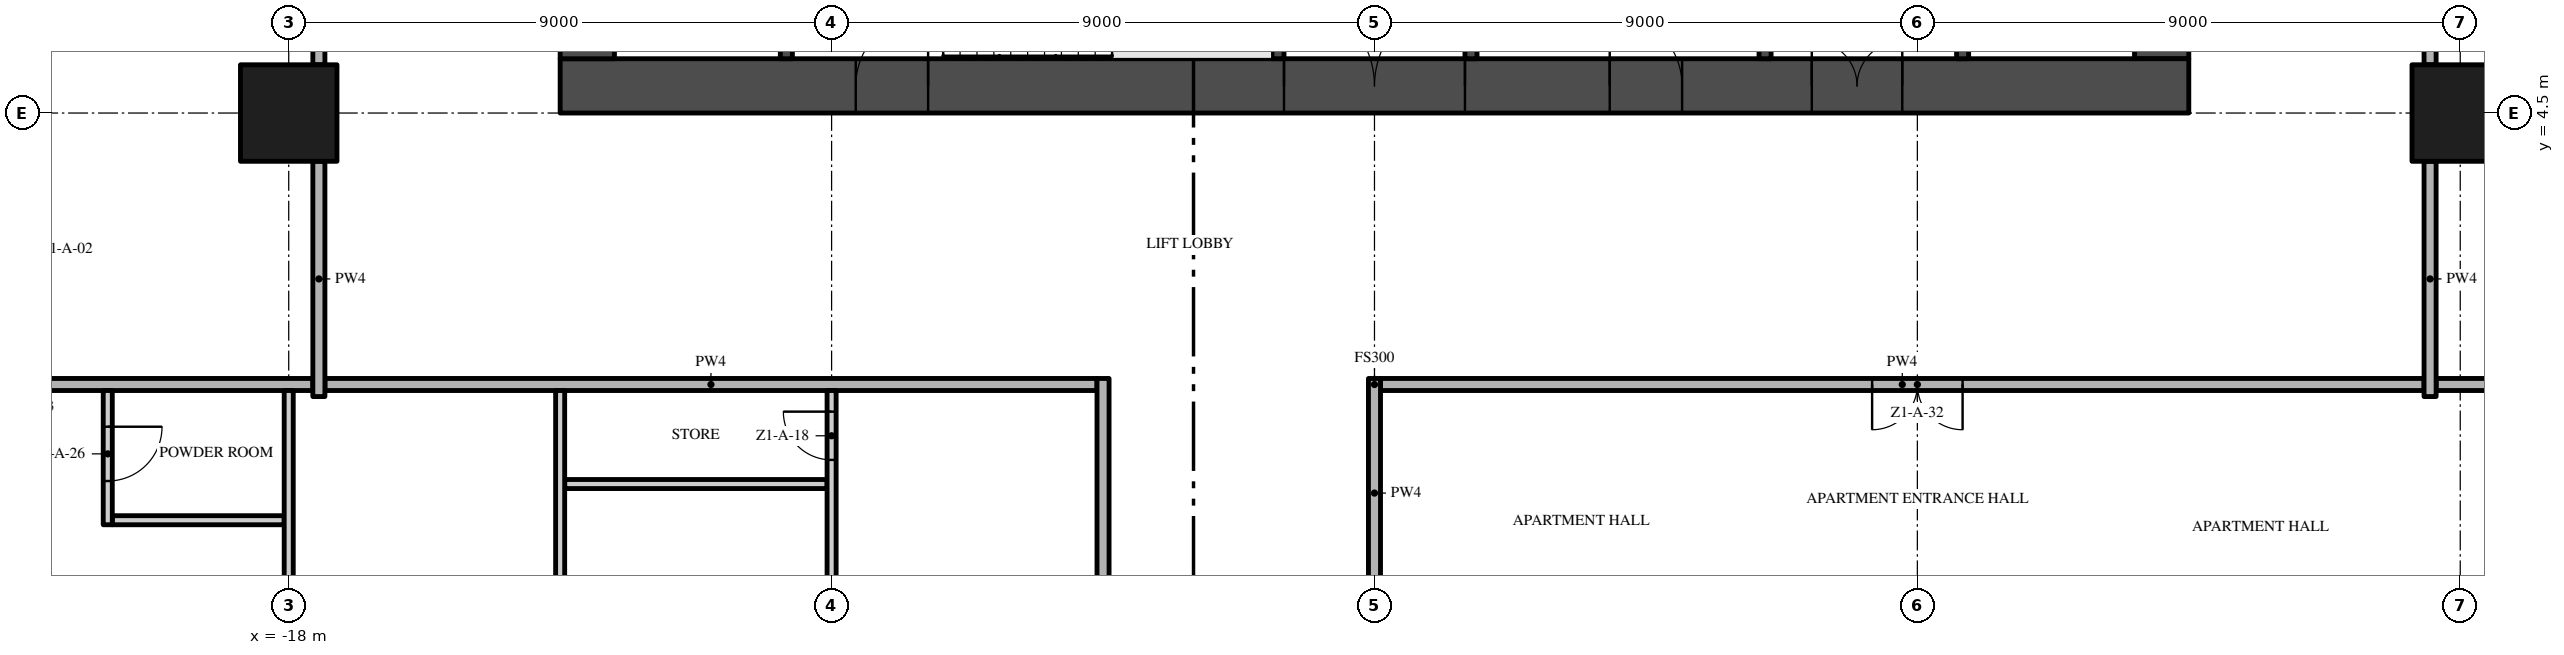
"""IFC4 building model, lengths in metres.
Left out: names, types, materials, properties, quantities, classifications, styles, units other than length and angle.
Written with IfcOpenShell. Run it as: python <this file> out.ifc"""

import sys

from ifc_helpers import new_model, si_unit, direction, frame, frame_2d, origin, origin_2d, place, context, subcontext, project, spatial, rectangle, extrude, element, fill, save


model = new_model("IFC4")
c1 = context("Model", 3, precision=1e-05, world=origin(), true_north=direction((0.0, 1.0)))
c2 = subcontext(c1, "Body", "Model", "MODEL_VIEW")
j1 = project(units=[si_unit("LENGTHUNIT", "METRE"), si_unit("PLANEANGLEUNIT", "RADIAN")], contexts=[c1])
p1 = place(None, origin())
s1 = spatial("IfcSite", under=j1, at=p1, CompositionType="ELEMENT")
p2 = place(p1, origin())
s2 = spatial("IfcBuilding", under=s1, at=p2, CompositionType="ELEMENT")
p3 = place(p2, frame((0.0, 0.0, 18.8)))
s3 = spatial("IfcBuildingStorey", under=s2, at=p3, CompositionType="ELEMENT", Elevation=18.8)
p4 = place(p3, frame((-13.5, 4.95, -0.3), z_axis=(0.0, 0.0, 1.0), x_axis=(1.0, 0.0, 0.0)))
e1 = element("IfcWall", 1, at=p4, inside=s3, PredefinedType="SHEAR", context=c2, shape_type="SweptSolid", body=[
    extrude(rectangle(XDim=27.0, YDim=0.9, at=frame_2d((13.5, 0.0))), origin(), (0.0, 0.0, 1.0), 3.8),
])
p5 = place(p4, frame((12.0, 0.0, 0.3)))
e2 = element("IfcOpeningElement", 2, at=p5, cuts=e1, PredefinedType="OPENING", context=c2, shape_type="SweptSolid", body=[
    extrude(rectangle(XDim=3.0, YDim=2.4, at=frame_2d((1.5, 1.2))), frame((0.0, 0.46, 0.0), z_axis=(0.0, -1.0, 0.0), x_axis=(1.0, 0.0, 0.0)), (0.0, 0.0, 1.0), 0.92),
])
p6 = place(p4, frame((4.9, 0.0, 0.3)))
e3 = element("IfcOpeningElement", 3, at=p6, cuts=e1, PredefinedType="OPENING", context=c2, shape_type="SweptSolid", body=[
    extrude(rectangle(XDim=1.2, YDim=2.2, at=frame_2d((0.6, 1.1))), frame((0.0, 0.46, 0.0), z_axis=(0.0, -1.0, 0.0), x_axis=(1.0, 0.0, 0.0)), (0.0, 0.0, 1.0), 0.92),
])
p7 = place(p4, frame((20.75, 0.0, 0.3)))
e4 = element("IfcOpeningElement", 4, at=p7, cuts=e1, PredefinedType="OPENING", context=c2, shape_type="SweptSolid", body=[
    extrude(rectangle(XDim=1.5, YDim=2.2, at=frame_2d((0.75, 1.1))), frame((0.0, 0.46, 0.0), z_axis=(0.0, -1.0, 0.0), x_axis=(1.0, 0.0, 0.0)), (0.0, 0.0, 1.0), 0.92),
])
p8 = place(p4, frame((17.4, 0.0, 0.3)))
e5 = element("IfcOpeningElement", 5, at=p8, cuts=e1, PredefinedType="OPENING", context=c2, shape_type="SweptSolid", body=[
    extrude(rectangle(XDim=1.2, YDim=2.2, at=frame_2d((0.6, 1.1))), frame((0.0, 0.46, 0.0), z_axis=(0.0, -1.0, 0.0), x_axis=(1.0, 0.0, 0.0)), (0.0, 0.0, 1.0), 0.92),
])
p9 = place(p3, frame((13.05, 5.4, -0.3), z_axis=(0.0, 0.0, 1.0), x_axis=(0.0, 1.0, 0.0)))
e6 = element("IfcWall", 6, at=p9, inside=s3, PredefinedType="SHEAR", context=c2, shape_type="SweptSolid", body=[
    extrude(rectangle(XDim=16.2, YDim=0.9, at=frame_2d((8.1, 0.0))), origin(), (0.0, 0.0, 1.0), 3.8),
])
p10 = place(p9, frame((6.0, 0.0, 0.3)))
e7 = element("IfcOpeningElement", 7, at=p10, cuts=e6, PredefinedType="OPENING", context=c2, shape_type="SweptSolid", body=[
    extrude(rectangle(XDim=1.2, YDim=2.2, at=frame_2d((0.6, 1.1))), frame((0.0, 0.46, 0.0), z_axis=(0.0, -1.0, 0.0), x_axis=(1.0, 0.0, 0.0)), (0.0, 0.0, 1.0), 0.92),
])
p11 = place(p3, frame((-13.05, 21.6, -0.3), z_axis=(0.0, 0.0, 1.0), x_axis=(0.0, -1.0, 0.0)))
e8 = element("IfcWall", 8, at=p11, inside=s3, PredefinedType="SHEAR", context=c2, shape_type="SweptSolid", body=[
    extrude(rectangle(XDim=16.2, YDim=0.9, at=frame_2d((8.1, 0.0))), origin(), (0.0, 0.0, 1.0), 3.8),
])
p12 = place(p11, frame((9.0, 0.0, 0.3)))
e9 = element("IfcOpeningElement", 9, at=p12, cuts=e8, PredefinedType="OPENING", context=c2, shape_type="SweptSolid", body=[
    extrude(rectangle(XDim=1.2, YDim=2.2, at=frame_2d((0.6, 1.1))), frame((0.0, 0.46, 0.0), z_axis=(0.0, -1.0, 0.0), x_axis=(1.0, 0.0, 0.0)), (0.0, 0.0, 1.0), 0.92),
])
for number, where, z_axis, x_axis in (
    (10, (-18.0, 4.5, 0.0), (0.0, 0.0, 1.0), (1.0, 0.0, 0.0)),
    (11, (18.0, 4.5, 0.0), (0.0, 0.0, 1.0), (1.0, 0.0, 0.0)),
):
    element("IfcColumn", number, at=place(p3, frame(where, z_axis=z_axis, x_axis=x_axis)), inside=s3, PredefinedType="COLUMN", context=c2, shape_type="SweptSolid", body=[
        extrude(rectangle(XDim=1.6, YDim=1.6, at=origin_2d()), origin(), (0.0, 0.0, 1.0), 3.5),
    ])
for number, where, z_axis, x_axis in (
    (12, (-9.75, 5.4, 0.0), (0.0, 0.0, 1.0), (0.0, 1.0, 0.0)),
    (13, (-1.6, 5.4, 0.0), (0.0, 0.0, 1.0), (0.0, 1.0, 0.0)),
):
    element("IfcWall", number, at=place(p3, frame(where, z_axis=z_axis, x_axis=x_axis)), inside=s3, PredefinedType="SHEAR", context=c2, shape_type="SweptSolid", body=[
        extrude(rectangle(XDim=2.55, YDim=0.2, at=frame_2d((1.275, 0.0))), origin(), (0.0, 0.0, 1.0), 3.5),
    ])
p13 = place(p3, frame((1.6, 11.5, 0.0), z_axis=(0.0, 0.0, 1.0), x_axis=(0.0, -1.0, 0.0)))
e14 = element("IfcWall", 14, at=p13, inside=s3, PredefinedType="SHEAR", context=c2, shape_type="SweptSolid", body=[
    extrude(rectangle(XDim=6.1, YDim=0.2, at=frame_2d((3.05, 0.0))), origin(), (0.0, 0.0, 1.0), 3.5),
])
p14 = place(p13, frame((2.2, 0.0, 0.0)))
e15 = element("IfcOpeningElement", 15, at=p14, cuts=e14, PredefinedType="OPENING", context=c2, shape_type="SweptSolid", body=[
    extrude(rectangle(XDim=0.9, YDim=2.1, at=frame_2d((0.45, 1.05))), frame((0.0, 0.11, 0.0), z_axis=(0.0, -1.0, 0.0), x_axis=(1.0, 0.0, 0.0)), (0.0, 0.0, 1.0), 0.22),
])
p15 = place(p3, frame((6.475, 5.4, 0.0), z_axis=(0.0, 0.0, 1.0), x_axis=(0.0, 1.0, 0.0)))
e16 = element("IfcWall", 16, at=p15, inside=s3, PredefinedType="SHEAR", context=c2, shape_type="SweptSolid", body=[
    extrude(rectangle(XDim=6.1, YDim=0.2, at=frame_2d((3.05, 0.0))), origin(), (0.0, 0.0, 1.0), 3.5),
])
p16 = place(p3, frame((9.75, 5.4, 0.0), z_axis=(0.0, 0.0, 1.0), x_axis=(0.0, 1.0, 0.0)))
e17 = element("IfcWall", 17, at=p16, inside=s3, PredefinedType="SHEAR", context=c2, shape_type="SweptSolid", body=[
    extrude(rectangle(XDim=2.2, YDim=0.2, at=frame_2d((1.1, 0.0))), origin(), (0.0, 0.0, 1.0), 3.5),
])
p17 = place(p16, frame((0.55, 0.0, 0.0)))
e18 = element("IfcOpeningElement", 18, at=p17, cuts=e17, PredefinedType="OPENING", context=c2, shape_type="SweptSolid", body=[
    extrude(rectangle(XDim=1.1, YDim=2.1, at=frame_2d((0.55, 1.05))), frame((0.0, 0.11, 0.0), z_axis=(0.0, -1.0, 0.0), x_axis=(1.0, 0.0, 0.0)), (0.0, 0.0, 1.0), 0.22),
])
p18 = place(p3, frame((-20.925, -2.25, 0.0), z_axis=(0.0, 0.0, 1.0), x_axis=(1.0, 0.0, 0.0)))
e19 = element("IfcWall", 19, at=p18, inside=s3, PredefinedType="PARTITIONING", context=c2, shape_type="SweptSolid", body=[
    extrude(rectangle(XDim=2.85, YDim=0.15, at=frame_2d((1.425, 0.0))), origin(), (0.0, 0.0, 1.0), 3.5),
])
p19 = place(p3, frame((-13.425, -1.65, 0.0), z_axis=(0.0, 0.0, 1.0), x_axis=(1.0, 0.0, 0.0)))
e20 = element("IfcWall", 20, at=p19, inside=s3, PredefinedType="PARTITIONING", context=c2, shape_type="SweptSolid", body=[
    extrude(rectangle(XDim=4.35, YDim=0.15, at=frame_2d((2.175, 0.0))), origin(), (0.0, 0.0, 1.0), 3.5),
])
p20 = place(p3, frame((-17.4, 0.0, 0.0), z_axis=(0.0, 0.0, 1.0), x_axis=(1.0, 0.0, 0.0)))
e21 = element("IfcWall", 21, at=p20, inside=s3, PredefinedType="PARTITIONING", context=c2, shape_type="SweptSolid", body=[
    extrude(rectangle(XDim=12.8, YDim=0.2, at=frame_2d((6.4, 0.0))), origin(), (0.0, 0.0, 1.0), 3.5),
])
p21 = place(p3, frame((17.4, 0.0, 0.0), z_axis=(0.0, 0.0, 1.0), x_axis=(-1.0, 0.0, 0.0)))
e22 = element("IfcWall", 22, at=p21, inside=s3, PredefinedType="PARTITIONING", context=c2, shape_type="SweptSolid", body=[
    extrude(rectangle(XDim=17.3, YDim=0.2, at=frame_2d((8.65, 0.0))), origin(), (0.0, 0.0, 1.0), 3.5),
])
p22 = place(p21, frame((7.65, 0.0, 0.0)))
e23 = element("IfcOpeningElement", 23, at=p22, cuts=e22, PredefinedType="OPENING", context=c2, shape_type="SweptSolid", body=[
    extrude(rectangle(XDim=1.5, YDim=2.4, at=frame_2d((0.75, 1.2))), frame((0.0, 0.11, 0.0), z_axis=(0.0, -1.0, 0.0), x_axis=(1.0, 0.0, 0.0)), (0.0, 0.0, 1.0), 0.22),
])
for number, where, z_axis, x_axis in (
    (24, (-26.7, 0.0, 0.0), (0.0, 0.0, 1.0), (1.0, 0.0, 0.0)),
    (25, (17.6, 0.0, 0.0), (0.0, 0.0, 1.0), (1.0, 0.0, 0.0)),
):
    element("IfcWall", number, at=place(p3, frame(where, z_axis=z_axis, x_axis=x_axis)), inside=s3, PredefinedType="PARTITIONING", context=c2, shape_type="SweptSolid", body=[
        extrude(rectangle(XDim=9.1, YDim=0.2, at=frame_2d((4.55, 0.0))), origin(), (0.0, 0.0, 1.0), 3.5),
    ])
p23 = place(p3, frame((-21.0, -0.1, 0.0), z_axis=(0.0, 0.0, 1.0), x_axis=(0.0, -1.0, 0.0)))
e26 = element("IfcWall", 26, at=p23, inside=s3, PredefinedType="PARTITIONING", context=c2, shape_type="SweptSolid", body=[
    extrude(rectangle(XDim=2.225, YDim=0.15, at=frame_2d((1.113, 0.0))), origin(), (0.0, 0.0, 1.0), 3.5),
])
p24 = place(p23, frame((0.6, 0.0, 0.0)))
e27 = element("IfcOpeningElement", 27, at=p24, cuts=e26, PredefinedType="OPENING", context=c2, shape_type="SweptSolid", body=[
    extrude(rectangle(XDim=0.9, YDim=2.1, at=frame_2d((0.45, 1.05))), frame((0.0, 0.085, 0.0), z_axis=(0.0, -1.0, 0.0), x_axis=(1.0, 0.0, 0.0)), (0.0, 0.0, 1.0), 0.17),
])
p25 = place(p3, frame((-18.0, -3.7, 0.0), z_axis=(0.0, 0.0, 1.0), x_axis=(0.0, 1.0, 0.0)))
e28 = element("IfcWall", 28, at=p25, inside=s3, PredefinedType="PARTITIONING", context=c2, shape_type="SweptSolid", body=[
    extrude(rectangle(XDim=3.6, YDim=0.15, at=frame_2d((1.8, 0.0))), origin(), (0.0, 0.0, 1.0), 3.5),
])
p26 = place(p3, frame((-17.5, -0.2, 0.0), z_axis=(0.0, 0.0, 1.0), x_axis=(0.0, 1.0, 0.0)))
e29 = element("IfcWall", 29, at=p26, inside=s3, PredefinedType="PARTITIONING", context=c2, shape_type="SweptSolid", body=[
    extrude(rectangle(XDim=3.9, YDim=0.2, at=frame_2d((1.95, 0.0))), origin(), (0.0, 0.0, 1.0), 3.5),
])
p27 = place(p3, frame((-17.5, 5.3, 0.0), z_axis=(0.0, 0.0, 1.0), x_axis=(0.0, 1.0, 0.0)))
e30 = element("IfcWall", 30, at=p27, inside=s3, PredefinedType="PARTITIONING", context=c2, shape_type="SweptSolid", body=[
    extrude(rectangle(XDim=7.4, YDim=0.2, at=frame_2d((3.7, 0.0))), origin(), (0.0, 0.0, 1.0), 3.5),
])
p28 = place(p3, frame((-13.5, -9.975, 0.0), z_axis=(0.0, 0.0, 1.0), x_axis=(0.0, 1.0, 0.0)))
e31 = element("IfcWall", 31, at=p28, inside=s3, PredefinedType="PARTITIONING", context=c2, shape_type="SweptSolid", body=[
    extrude(rectangle(XDim=9.875, YDim=0.15, at=frame_2d((4.938, 0.0))), origin(), (0.0, 0.0, 1.0), 3.5),
])
p29 = place(p3, frame((-9.0, -3.7, 0.0), z_axis=(0.0, 0.0, 1.0), x_axis=(0.0, 1.0, 0.0)))
e32 = element("IfcWall", 32, at=p29, inside=s3, PredefinedType="PARTITIONING", context=c2, shape_type="SweptSolid", body=[
    extrude(rectangle(XDim=3.6, YDim=0.15, at=frame_2d((1.8, 0.0))), origin(), (0.0, 0.0, 1.0), 3.5),
])
p30 = place(p29, frame((2.45, 0.0, 0.0)))
e33 = element("IfcOpeningElement", 33, at=p30, cuts=e32, PredefinedType="OPENING", context=c2, shape_type="SweptSolid", body=[
    extrude(rectangle(XDim=0.8, YDim=2.0, at=frame_2d((0.4, 1.0))), frame((0.0, 0.085, 0.0), z_axis=(0.0, -1.0, 0.0), x_axis=(1.0, 0.0, 0.0)), (0.0, 0.0, 1.0), 0.17),
])
p31 = place(p3, frame((-4.5, -22.2, 0.0), z_axis=(0.0, 0.0, 1.0), x_axis=(0.0, 1.0, 0.0)))
e34 = element("IfcWall", 34, at=p31, inside=s3, PredefinedType="PARTITIONING", context=c2, shape_type="SweptSolid", body=[
    extrude(rectangle(XDim=22.3, YDim=0.2, at=frame_2d((11.15, 0.0))), origin(), (0.0, 0.0, 1.0), 3.5),
])
p32 = place(p31, frame((10.2, 0.0, 0.0)))
e35 = element("IfcOpeningElement", 35, at=p32, cuts=e34, PredefinedType="OPENING", context=c2, shape_type="SweptSolid", body=[
    extrude(rectangle(XDim=1.5, YDim=2.4, at=frame_2d((0.75, 1.2))), frame((0.0, 0.11, 0.0), z_axis=(0.0, -1.0, 0.0), x_axis=(1.0, 0.0, 0.0)), (0.0, 0.0, 1.0), 0.22),
])
p33 = place(p3, frame((0.0, -3.7, 0.0), z_axis=(0.0, 0.0, 1.0), x_axis=(0.0, 1.0, 0.0)))
e36 = element("IfcWall", 36, at=p33, inside=s3, PredefinedType="PARTITIONING", context=c2, shape_type="SweptSolid", body=[
    extrude(rectangle(XDim=3.8, YDim=0.2, at=frame_2d((1.9, 0.0))), origin(), (0.0, 0.0, 1.0), 3.5),
])
p34 = place(p3, frame((17.5, -0.2, 0.0), z_axis=(0.0, 0.0, 1.0), x_axis=(0.0, 1.0, 0.0)))
e37 = element("IfcWall", 37, at=p34, inside=s3, PredefinedType="PARTITIONING", context=c2, shape_type="SweptSolid", body=[
    extrude(rectangle(XDim=3.9, YDim=0.2, at=frame_2d((1.95, 0.0))), origin(), (0.0, 0.0, 1.0), 3.5),
])
p35 = place(p3, frame((17.5, 5.3, 0.0), z_axis=(0.0, 0.0, 1.0), x_axis=(0.0, 1.0, 0.0)))
e38 = element("IfcWall", 38, at=p35, inside=s3, PredefinedType="PARTITIONING", context=c2, shape_type="SweptSolid", body=[
    extrude(rectangle(XDim=7.4, YDim=0.2, at=frame_2d((3.7, 0.0))), origin(), (0.0, 0.0, 1.0), 3.5),
])
p36 = place(p5, frame((3.0, 0.0, 0.0), z_axis=(0.0, 0.0, 1.0), x_axis=(-1.0, 0.0, 0.0)))
e39 = element("IfcDoor", 39, at=p36, inside=s3, OperationType="DOUBLE_DOOR_SINGLE_SWING", PredefinedType="DOOR", context=c2, shape_type="SweptSolid", body=[
    extrude(rectangle(XDim=3.0, YDim=2.4, at=frame_2d((1.5, 1.2))), frame((0.0, 0.025, 0.0), z_axis=(0.0, -1.0, 0.0), x_axis=(1.0, 0.0, 0.0)), (0.0, 0.0, 1.0), 0.05),
])
fill(e2, e39)
p37 = place(p6, frame((1.2, 0.0, 0.0), z_axis=(0.0, 0.0, 1.0), x_axis=(-1.0, 0.0, 0.0)))
e40 = element("IfcDoor", 40, at=p37, inside=s3, OperationType="SINGLE_SWING_LEFT", PredefinedType="DOOR", context=c2, shape_type="SweptSolid", body=[
    extrude(rectangle(XDim=1.2, YDim=2.2, at=frame_2d((0.6, 1.1))), frame((0.0, 0.025, 0.0), z_axis=(0.0, -1.0, 0.0), x_axis=(1.0, 0.0, 0.0)), (0.0, 0.0, 1.0), 0.05),
])
fill(e3, e40)
p38 = place(p7, frame((1.5, 0.0, 0.0), z_axis=(0.0, 0.0, 1.0), x_axis=(-1.0, 0.0, 0.0)))
e41 = element("IfcDoor", 41, at=p38, inside=s3, OperationType="DOUBLE_DOOR_SINGLE_SWING", PredefinedType="DOOR", context=c2, shape_type="SweptSolid", body=[
    extrude(rectangle(XDim=1.5, YDim=2.2, at=frame_2d((0.75, 1.1))), frame((0.0, 0.025, 0.0), z_axis=(0.0, -1.0, 0.0), x_axis=(1.0, 0.0, 0.0)), (0.0, 0.0, 1.0), 0.05),
])
fill(e4, e41)
p39 = place(p8, frame((1.2, 0.0, 0.0), z_axis=(0.0, 0.0, 1.0), x_axis=(-1.0, 0.0, 0.0)))
e42 = element("IfcDoor", 42, at=p39, inside=s3, OperationType="SINGLE_SWING_RIGHT", PredefinedType="DOOR", context=c2, shape_type="SweptSolid", body=[
    extrude(rectangle(XDim=1.2, YDim=2.2, at=frame_2d((0.6, 1.1))), frame((0.0, 0.025, 0.0), z_axis=(0.0, -1.0, 0.0), x_axis=(1.0, 0.0, 0.0)), (0.0, 0.0, 1.0), 0.05),
])
fill(e5, e42)
p40 = place(p30, origin())
e43 = element("IfcDoor", 43, at=p40, inside=s3, OperationType="SINGLE_SWING_RIGHT", PredefinedType="DOOR", context=c2, shape_type="SweptSolid", body=[
    extrude(rectangle(XDim=0.8, YDim=2.0, at=frame_2d((0.4, 1.0))), frame((0.0, 0.025, 0.0), z_axis=(0.0, -1.0, 0.0), x_axis=(1.0, 0.0, 0.0)), (0.0, 0.0, 1.0), 0.05),
])
fill(e33, e43)
p41 = place(p24, origin())
e44 = element("IfcDoor", 44, at=p41, inside=s3, OperationType="SINGLE_SWING_LEFT", PredefinedType="DOOR", context=c2, shape_type="SweptSolid", body=[
    extrude(rectangle(XDim=0.9, YDim=2.1, at=frame_2d((0.45, 1.05))), frame((0.0, 0.025, 0.0), z_axis=(0.0, -1.0, 0.0), x_axis=(1.0, 0.0, 0.0)), (0.0, 0.0, 1.0), 0.05),
])
fill(e27, e44)
p42 = place(p22, origin())
e45 = element("IfcDoor", 45, at=p42, inside=s3, OperationType="DOUBLE_DOOR_SINGLE_SWING", PredefinedType="DOOR", context=c2, shape_type="SweptSolid", body=[
    extrude(rectangle(XDim=1.5, YDim=2.4, at=frame_2d((0.75, 1.2))), frame((0.0, 0.025, 0.0), z_axis=(0.0, -1.0, 0.0), x_axis=(1.0, 0.0, 0.0)), (0.0, 0.0, 1.0), 0.05),
])
fill(e23, e45)
save(model, sys.argv[1])
